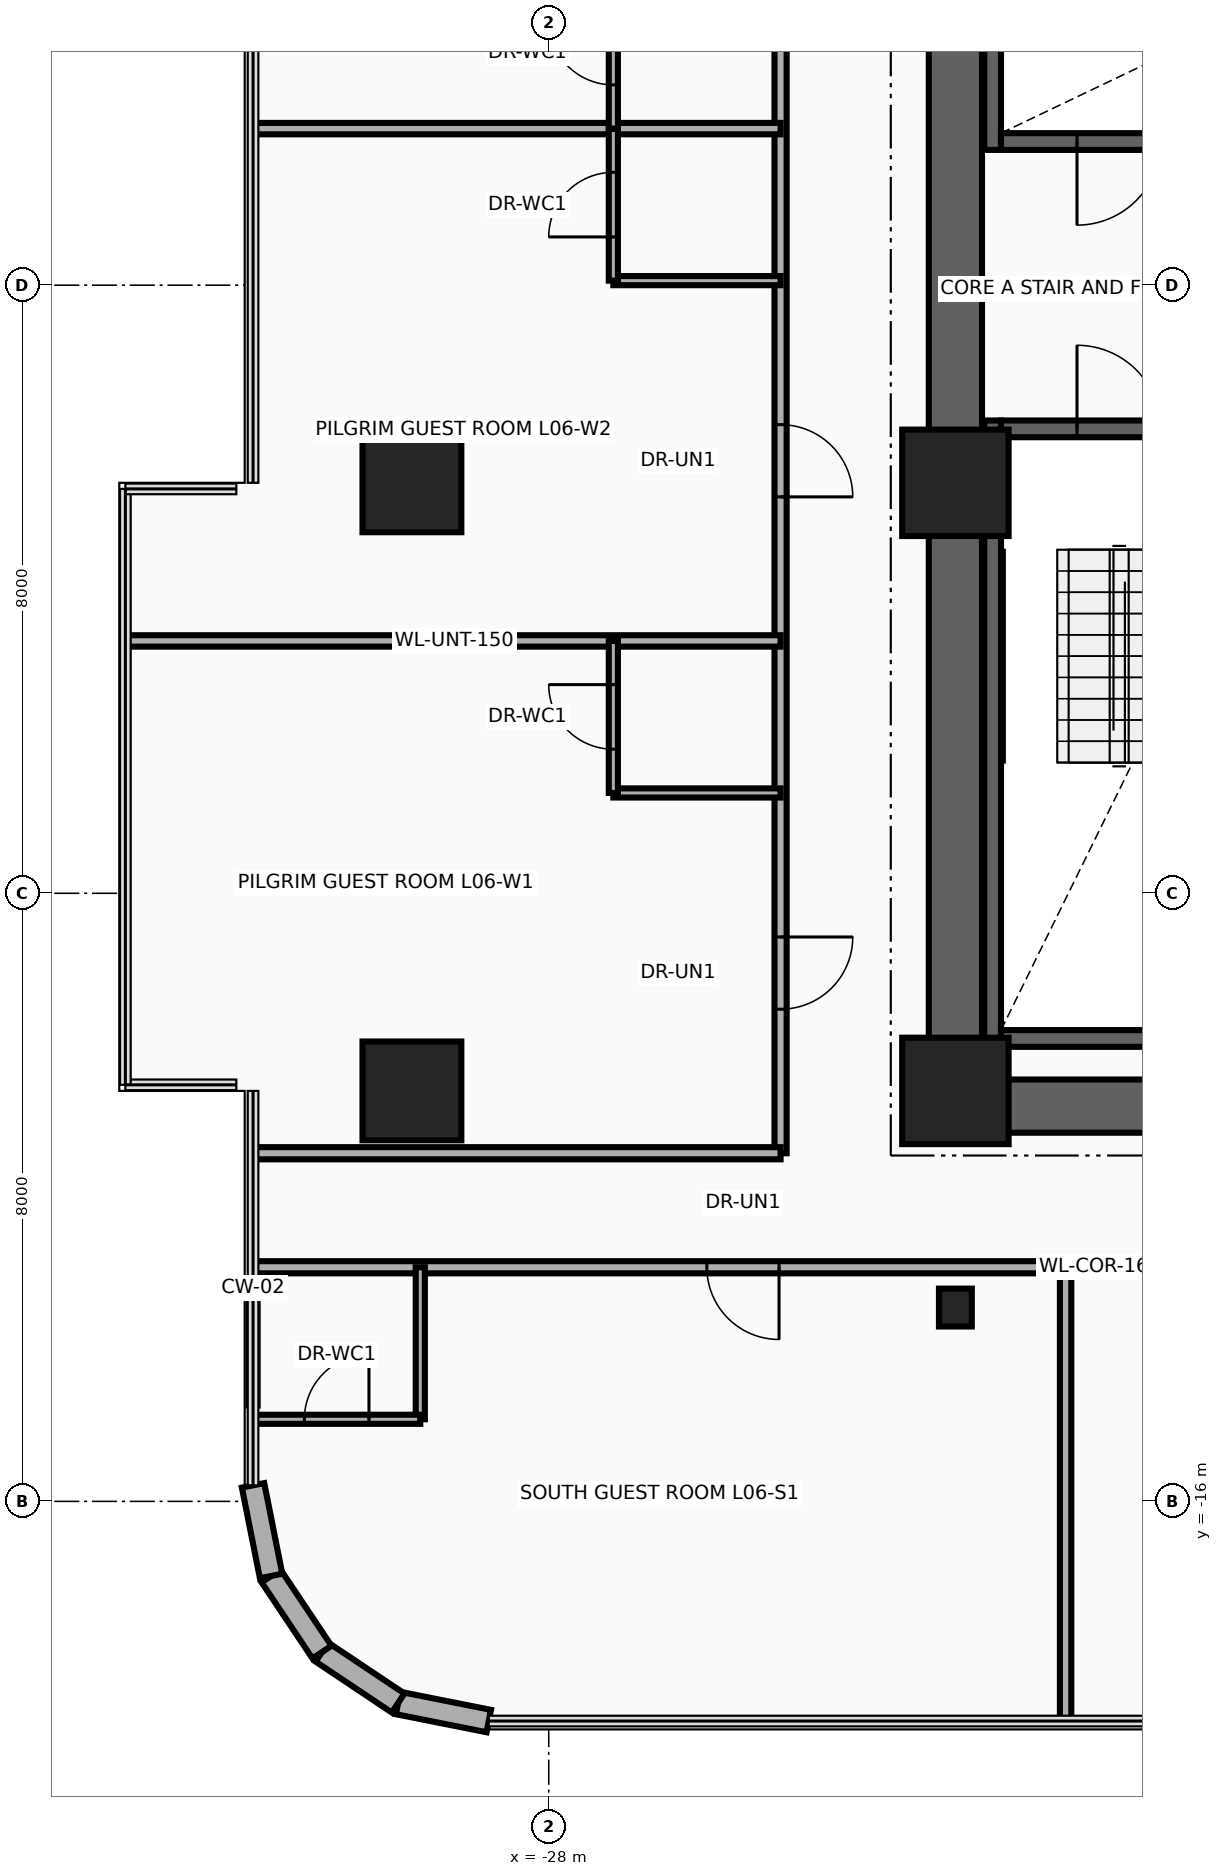
"""IFC4 building model, lengths in metres.
Left out: names, types, materials, properties, quantities, classifications, styles, units other than length and angle.
Written with IfcOpenShell. Run it as: python <this file> out.ifc"""

import sys

from ifc_helpers import new_model, si_unit, direction, frame, frame_2d, origin, origin_2d, place, context, subcontext, project, spatial, rectangle, circle, i_section, extrude, source, transform, mapped, element, fill, save


model = new_model("IFC4")
c1 = context("Model", 3, precision=1e-05, world=origin(), true_north=direction((0.0, 1.0)))
c2 = subcontext(c1, "Body", "Model", "MODEL_VIEW")
j1 = project(units=[si_unit("LENGTHUNIT", "METRE"), si_unit("PLANEANGLEUNIT", "RADIAN")], contexts=[c1])
p1 = place(None, origin())
s1 = spatial("IfcSite", under=j1, at=p1, CompositionType="ELEMENT")
p2 = place(p1, origin())
s2 = spatial("IfcBuilding", under=s1, at=p2, CompositionType="ELEMENT")
p3 = place(p2, frame((0.0, 0.0, 29.7)))
s3 = spatial("IfcBuildingStorey", under=s2, at=p3, CompositionType="ELEMENT", Elevation=29.7)
p4 = place(p3, frame((-22.16, 1.78, 0.0), z_axis=(0.0, 0.0, 1.0), x_axis=(0.0, 1.0, 0.0)))
e1 = element("IfcWall", 1, at=p4, inside=s3, PredefinedType="SHEAR", context=c2, shape_type="SweptSolid", body=[
    extrude(rectangle(XDim=8.67, YDim=0.22, at=frame_2d((4.335, 0.0))), origin(), (0.0, 0.0, 1.0), 3.46),
])
p5 = place(p3, frame((-22.05, 1.89, 0.0), z_axis=(0.0, 0.0, 1.0), x_axis=(1.0, 0.0, 0.0)))
e2 = element("IfcWall", 2, at=p5, inside=s3, PredefinedType="SHEAR", context=c2, shape_type="SweptSolid", body=[
    extrude(rectangle(XDim=3.11, YDim=0.22, at=frame_2d((1.555, 0.0))), origin(), (0.0, 0.0, 1.0), 3.46),
])
p6 = place(p5, frame((1.0, 0.0, 0.0)))
e3 = element("IfcOpeningElement", 3, at=p6, cuts=e2, PredefinedType="OPENING", context=c2, shape_type="SweptSolid", body=[
    extrude(rectangle(XDim=1.1, YDim=2.15, at=frame_2d((0.55, 1.075))), frame((0.0, 0.125, 0.0), z_axis=(0.0, -1.0, 0.0), x_axis=(1.0, 0.0, 0.0)), (0.0, 0.0, 1.0), 0.25),
])
p7 = place(p3, frame((-22.16, -10.45, 0.0), z_axis=(0.0, 0.0, 1.0), x_axis=(0.0, 1.0, 0.0)))
e4 = element("IfcWall", 4, at=p7, inside=s3, PredefinedType="SHEAR", context=c2, shape_type="SweptSolid", body=[
    extrude(rectangle(XDim=8.67, YDim=0.22, at=frame_2d((4.335, 0.0))), origin(), (0.0, 0.0, 1.0), 3.46),
])
p8 = place(p3, frame((-22.05, -9.91, 0.0), z_axis=(0.0, 0.0, 1.0), x_axis=(1.0, 0.0, 0.0)))
e5 = element("IfcWall", 5, at=p8, inside=s3, PredefinedType="SHEAR", context=c2, shape_type="SweptSolid", body=[
    extrude(rectangle(XDim=3.11, YDim=0.22, at=frame_2d((1.555, 0.0))), origin(), (0.0, 0.0, 1.0), 3.46),
])
p9 = place(p3, frame((-22.05, -1.89, 0.0), z_axis=(0.0, 0.0, 1.0), x_axis=(1.0, 0.0, 0.0)))
e6 = element("IfcWall", 6, at=p9, inside=s3, PredefinedType="SHEAR", context=c2, shape_type="SweptSolid", body=[
    extrude(rectangle(XDim=3.11, YDim=0.22, at=frame_2d((1.555, 0.0))), origin(), (0.0, 0.0, 1.0), 3.46),
])
p10 = place(p9, frame((1.0, 0.0, 0.0)))
e7 = element("IfcOpeningElement", 7, at=p10, cuts=e6, PredefinedType="OPENING", context=c2, shape_type="SweptSolid", body=[
    extrude(rectangle(XDim=1.1, YDim=2.15, at=frame_2d((0.55, 1.075))), frame((0.0, 0.125, 0.0), z_axis=(0.0, -1.0, 0.0), x_axis=(1.0, 0.0, 0.0)), (0.0, 0.0, 1.0), 0.25),
])
p11 = place(p3, frame((-22.65, -11.15, 0.0), z_axis=(0.0, 0.0, 1.0), x_axis=(0.0, 1.0, 0.0)))
e8 = element("IfcWall", 8, at=p11, inside=s3, PredefinedType="SHEAR", context=c2, shape_type="SweptSolid", body=[
    extrude(rectangle(XDim=22.3, YDim=0.7, at=frame_2d((11.15, 0.0))), origin(), (0.0, 0.0, 1.0), 3.46),
])
p12 = place(p3, frame((-22.65, -10.8, 0.0), z_axis=(0.0, 0.0, 1.0), x_axis=(1.0, 0.0, 0.0)))
e9 = element("IfcWall", 9, at=p12, inside=s3, PredefinedType="SHEAR", context=c2, shape_type="SweptSolid", body=[
    extrude(rectangle(XDim=10.25, YDim=0.7, at=frame_2d((5.125, 0.0))), origin(), (0.0, 0.0, 1.0), 3.46),
])
m1 = source(origin(), c2, "Body", "SweptSolid", [
    extrude(circle(Radius=0.65, at=origin_2d()), origin(), (0.0, 0.0, 1.0), 3.7),
])
p13 = place(p3, frame((-29.8, -10.6, 0.0), z_axis=(0.0, 0.0, 1.0), x_axis=(1.0, 0.0, 0.0)))
e10 = element("IfcColumn", 10, at=p13, inside=s3, PredefinedType="COLUMN", context=c2, shape_type="MappedRepresentation", body=[
    mapped(m1, transform((0.0, 0.0, 0.0), x_axis=(1.0, 0.0, 0.0), y_axis=(0.0, 1.0, 0.0), z_axis=(0.0, 0.0, 1.0), scale=1.0)),
])
m2 = source(origin(), c2, "Body", "SweptSolid", [
    extrude(rectangle(XDim=1.4, YDim=1.4, at=origin_2d()), origin(), (0.0, 0.0, 1.0), 3.7),
])
p14 = place(p3, frame((-22.65, -10.6, 0.0), z_axis=(0.0, 0.0, 1.0), x_axis=(1.0, 0.0, 0.0)))
e11 = element("IfcColumn", 11, at=p14, inside=s3, PredefinedType="COLUMN", context=c2, shape_type="MappedRepresentation", body=[
    mapped(m2, transform((0.0, 0.0, 0.0), x_axis=(1.0, 0.0, 0.0), y_axis=(0.0, 1.0, 0.0), z_axis=(0.0, 0.0, 1.0), scale=1.0)),
])
p15 = place(p3, frame((-29.8, -2.6, 0.0), z_axis=(0.0, 0.0, 1.0), x_axis=(1.0, 0.0, 0.0)))
e12 = element("IfcColumn", 12, at=p15, inside=s3, PredefinedType="COLUMN", context=c2, shape_type="MappedRepresentation", body=[
    mapped(m1, transform((0.0, 0.0, 0.0), x_axis=(1.0, 0.0, 0.0), y_axis=(0.0, 1.0, 0.0), z_axis=(0.0, 0.0, 1.0), scale=1.0)),
])
p16 = place(p3, frame((-22.65, -2.6, 0.0), z_axis=(0.0, 0.0, 1.0), x_axis=(1.0, 0.0, 0.0)))
e13 = element("IfcColumn", 13, at=p16, inside=s3, PredefinedType="COLUMN", context=c2, shape_type="MappedRepresentation", body=[
    mapped(m2, transform((0.0, 0.0, 0.0), x_axis=(1.0, 0.0, 0.0), y_axis=(0.0, 1.0, 0.0), z_axis=(0.0, 0.0, 1.0), scale=1.0)),
])
m3 = source(origin(), c2, "Body", "SweptSolid", [
    extrude(i_section(OverallWidth=0.432, OverallDepth=0.498, WebThickness=0.056, FlangeThickness=0.089, at=origin_2d()), origin(), (0.0, 0.0, 1.0), 3.7),
])
p17 = place(p3, frame((-22.65, -13.45, 0.0), z_axis=(0.0, 0.0, 1.0), x_axis=(1.0, 0.0, 0.0)))
e14 = element("IfcColumn", 14, at=p17, inside=s3, PredefinedType="COLUMN", context=c2, shape_type="MappedRepresentation", body=[
    mapped(m3, transform((0.0, 0.0, 0.0), x_axis=(1.0, 0.0, 0.0), y_axis=(0.0, 1.0, 0.0), z_axis=(0.0, 0.0, 1.0), scale=1.0)),
])
p18 = place(p3, frame((-28.789, -18.89, 0.0), z_axis=(0.0, 0.0, 1.0), x_axis=(-0.980804027463, 0.194996050505, 0.0)))
e15 = element("IfcWall", 15, at=p18, inside=s3, PredefinedType="SOLIDWALL", context=c2, shape_type="SweptSolid", body=[
    extrude(rectangle(XDim=1.216, YDim=0.3, at=frame_2d((0.608, 0.0))), origin(), (0.0, 0.0, 1.0), 3.46),
])
for number, where, z_axis, x_axis in (
    (16, (-29.982, -18.653, 0.0), (0.0, 0.0, 1.0), (-0.831, 0.556, 0.0)),
    (17, (-30.983, -17.983, 0.0), (0.0, 0.0, 1.0), (-0.556, 0.831, 0.0)),
):
    element("IfcWall", number, at=place(p3, frame(where, z_axis=z_axis, x_axis=x_axis)), inside=s3, PredefinedType="SOLIDWALL", context=c2, shape_type="SweptSolid", body=[
        extrude(rectangle(XDim=1.205, YDim=0.3, at=frame_2d((0.603, 0.0))), origin(), (0.0, 0.0, 1.0), 3.46),
    ])
p19 = place(p3, frame((-31.653, -16.982, 0.0), z_axis=(0.0, 0.0, 1.0), x_axis=(-0.194996050505, 0.980804027463, 0.0)))
e18 = element("IfcWall", 18, at=p19, inside=s3, PredefinedType="SOLIDWALL", context=c2, shape_type="SweptSolid", body=[
    extrude(rectangle(XDim=1.216, YDim=0.3, at=frame_2d((0.608, 0.0))), origin(), (0.0, 0.0, 1.0), 3.46),
])
p20 = place(p3, frame((-24.95, -11.42, 0.0), z_axis=(0.0, 0.0, 1.0), x_axis=(0.0, 1.0, 0.0)))
e19 = element("IfcWall", 19, at=p20, inside=s3, PredefinedType="PARTITIONING", context=c2, shape_type="SweptSolid", body=[
    extrude(rectangle(XDim=20.22, YDim=0.16, at=frame_2d((10.11, 0.0))), origin(), (0.0, 0.0, 1.0), 2.583),
])
p21 = place(p20, frame((1.895, 0.0, 0.0)))
e20 = element("IfcOpeningElement", 20, at=p21, cuts=e19, PredefinedType="OPENING", context=c2, shape_type="SweptSolid", body=[
    extrude(rectangle(XDim=0.95, YDim=2.15, at=frame_2d((0.475, 1.075))), frame((0.0, 0.095, 0.0), z_axis=(0.0, -1.0, 0.0), x_axis=(1.0, 0.0, 0.0)), (0.0, 0.0, 1.0), 0.19),
])
p22 = place(p20, frame((8.635, 0.0, 0.0)))
e21 = element("IfcOpeningElement", 21, at=p22, cuts=e19, PredefinedType="OPENING", context=c2, shape_type="SweptSolid", body=[
    extrude(rectangle(XDim=0.95, YDim=2.15, at=frame_2d((0.475, 1.075))), frame((0.0, 0.095, 0.0), z_axis=(0.0, -1.0, 0.0), x_axis=(1.0, 0.0, 0.0)), (0.0, 0.0, 1.0), 0.19),
])
p23 = place(p20, frame((17.375, 0.0, 0.0)))
e22 = element("IfcOpeningElement", 22, at=p23, cuts=e19, PredefinedType="OPENING", context=c2, shape_type="SweptSolid", body=[
    extrude(rectangle(XDim=0.95, YDim=2.15, at=frame_2d((0.475, 1.075))), frame((0.0, 0.095, 0.0), z_axis=(0.0, -1.0, 0.0), x_axis=(1.0, 0.0, 0.0)), (0.0, 0.0, 1.0), 0.19),
])
p24 = place(p3, frame((-33.54, -4.68, 0.0), z_axis=(0.0, 0.0, 1.0), x_axis=(1.0, 0.0, 0.0)))
e23 = element("IfcWall", 23, at=p24, inside=s3, PredefinedType="PARTITIONING", context=c2, shape_type="SweptSolid", body=[
    extrude(rectangle(XDim=8.59, YDim=0.15, at=frame_2d((4.295, 0.0))), origin(), (0.0, 0.0, 1.0), 2.896),
])
p25 = place(p3, frame((-31.89, 2.06, 0.0), z_axis=(0.0, 0.0, 1.0), x_axis=(1.0, 0.0, 0.0)))
e24 = element("IfcWall", 24, at=p25, inside=s3, PredefinedType="PARTITIONING", context=c2, shape_type="SweptSolid", body=[
    extrude(rectangle(XDim=6.94, YDim=0.15, at=frame_2d((3.47, 0.0))), origin(), (0.0, 0.0, 1.0), 2.896),
])
p26 = place(p3, frame((-27.15, -6.68, 0.0), z_axis=(0.0, 0.0, 1.0), x_axis=(1.0, 0.0, 0.0)))
e25 = element("IfcWall", 25, at=p26, inside=s3, PredefinedType="PARTITIONING", context=c2, shape_type="SweptSolid", body=[
    extrude(rectangle(XDim=2.2, YDim=0.12, at=frame_2d((1.1, 0.0))), origin(), (0.0, 0.0, 1.0), 2.979),
])
p27 = place(p3, frame((-27.15, -6.68, 0.0), z_axis=(0.0, 0.0, 1.0), x_axis=(0.0, 1.0, 0.0)))
e26 = element("IfcWall", 26, at=p27, inside=s3, PredefinedType="PARTITIONING", context=c2, shape_type="SweptSolid", body=[
    extrude(rectangle(XDim=2.0, YDim=0.12, at=frame_2d((1.0, 0.0))), origin(), (0.0, 0.0, 1.0), 2.979),
])
p28 = place(p27, frame((0.575, 0.0, 0.0)))
e27 = element("IfcOpeningElement", 27, at=p28, cuts=e26, PredefinedType="OPENING", context=c2, shape_type="SweptSolid", body=[
    extrude(rectangle(XDim=0.85, YDim=2.1, at=frame_2d((0.425, 1.05))), frame((0.0, 0.075, 0.0), z_axis=(0.0, -1.0, 0.0), x_axis=(1.0, 0.0, 0.0)), (0.0, 0.0, 1.0), 0.15),
])
p29 = place(p3, frame((-27.15, 0.06, 0.0), z_axis=(0.0, 0.0, 1.0), x_axis=(1.0, 0.0, 0.0)))
e28 = element("IfcWall", 28, at=p29, inside=s3, PredefinedType="PARTITIONING", context=c2, shape_type="SweptSolid", body=[
    extrude(rectangle(XDim=2.2, YDim=0.12, at=frame_2d((1.1, 0.0))), origin(), (0.0, 0.0, 1.0), 2.979),
])
p30 = place(p3, frame((-27.15, 0.06, 0.0), z_axis=(0.0, 0.0, 1.0), x_axis=(0.0, 1.0, 0.0)))
e29 = element("IfcWall", 29, at=p30, inside=s3, PredefinedType="PARTITIONING", context=c2, shape_type="SweptSolid", body=[
    extrude(rectangle(XDim=2.0, YDim=0.12, at=frame_2d((1.0, 0.0))), origin(), (0.0, 0.0, 1.0), 2.979),
])
p31 = place(p30, frame((0.575, 0.0, 0.0)))
e30 = element("IfcOpeningElement", 30, at=p31, cuts=e29, PredefinedType="OPENING", context=c2, shape_type="SweptSolid", body=[
    extrude(rectangle(XDim=0.85, YDim=2.1, at=frame_2d((0.425, 1.05))), frame((0.0, 0.075, 0.0), z_axis=(0.0, -1.0, 0.0), x_axis=(1.0, 0.0, 0.0)), (0.0, 0.0, 1.0), 0.15),
])
p32 = place(p3, frame((-27.15, 2.06, 0.0), z_axis=(0.0, 0.0, 1.0), x_axis=(0.0, 1.0, 0.0)))
e31 = element("IfcWall", 31, at=p32, inside=s3, PredefinedType="PARTITIONING", context=c2, shape_type="SweptSolid", body=[
    extrude(rectangle(XDim=2.0, YDim=0.12, at=frame_2d((1.0, 0.0))), origin(), (0.0, 0.0, 1.0), 2.979),
])
p33 = place(p32, frame((0.575, 0.0, 0.0)))
e32 = element("IfcOpeningElement", 32, at=p33, cuts=e31, PredefinedType="OPENING", context=c2, shape_type="SweptSolid", body=[
    extrude(rectangle(XDim=0.85, YDim=2.1, at=frame_2d((0.425, 1.05))), frame((0.0, 0.075, 0.0), z_axis=(0.0, -1.0, 0.0), x_axis=(1.0, 0.0, 0.0)), (0.0, 0.0, 1.0), 0.15),
])
p34 = place(p3, frame((-31.89, -12.92, 0.0), z_axis=(0.0, 0.0, 1.0), x_axis=(1.0, 0.0, 0.0)))
e33 = element("IfcWall", 33, at=p34, inside=s3, PredefinedType="PARTITIONING", context=c2, shape_type="SweptSolid", body=[
    extrude(rectangle(XDim=22.28, YDim=0.16, at=frame_2d((11.14, 0.0))), origin(), (0.0, 0.0, 1.0), 2.834),
])
p35 = place(p34, frame((5.97, 0.0, 0.0)))
e34 = element("IfcOpeningElement", 34, at=p35, cuts=e33, PredefinedType="OPENING", context=c2, shape_type="SweptSolid", body=[
    extrude(rectangle(XDim=0.95, YDim=2.15, at=frame_2d((0.475, 1.075))), frame((0.0, 0.095, 0.0), z_axis=(0.0, -1.0, 0.0), x_axis=(1.0, 0.0, 0.0)), (0.0, 0.0, 1.0), 0.19),
])
p36 = place(p34, frame((16.01, 0.0, 0.0)))
e35 = element("IfcOpeningElement", 35, at=p36, cuts=e33, PredefinedType="OPENING", context=c2, shape_type="SweptSolid", body=[
    extrude(rectangle(XDim=0.95, YDim=2.15, at=frame_2d((0.475, 1.075))), frame((0.0, 0.095, 0.0), z_axis=(0.0, -1.0, 0.0), x_axis=(1.0, 0.0, 0.0)), (0.0, 0.0, 1.0), 0.19),
])
p37 = place(p3, frame((-21.2, -18.89, 0.0), z_axis=(0.0, 0.0, 1.0), x_axis=(0.0, 1.0, 0.0)))
e36 = element("IfcWall", 36, at=p37, inside=s3, PredefinedType="PARTITIONING", context=c2, shape_type="SweptSolid", body=[
    extrude(rectangle(XDim=5.97, YDim=0.15, at=frame_2d((2.985, 0.0))), origin(), (0.0, 0.0, 1.0), 2.896),
])
p38 = place(p3, frame((-29.69, -14.92, 0.0), z_axis=(0.0, 0.0, 1.0), x_axis=(0.0, 1.0, 0.0)))
e37 = element("IfcWall", 37, at=p38, inside=s3, PredefinedType="PARTITIONING", context=c2, shape_type="SweptSolid", body=[
    extrude(rectangle(XDim=2.0, YDim=0.12, at=frame_2d((1.0, 0.0))), origin(), (0.0, 0.0, 1.0), 3.46),
])
p39 = place(p3, frame((-31.89, -14.92, 0.0), z_axis=(0.0, 0.0, 1.0), x_axis=(1.0, 0.0, 0.0)))
e38 = element("IfcWall", 38, at=p39, inside=s3, PredefinedType="PARTITIONING", context=c2, shape_type="SweptSolid", body=[
    extrude(rectangle(XDim=2.2, YDim=0.12, at=frame_2d((1.1, 0.0))), origin(), (0.0, 0.0, 1.0), 3.46),
])
p40 = place(p39, frame((0.675, 0.0, 0.0)))
e39 = element("IfcOpeningElement", 39, at=p40, cuts=e38, PredefinedType="OPENING", context=c2, shape_type="SweptSolid", body=[
    extrude(rectangle(XDim=0.85, YDim=2.1, at=frame_2d((0.425, 1.05))), frame((0.0, 0.075, 0.0), z_axis=(0.0, -1.0, 0.0), x_axis=(1.0, 0.0, 0.0)), (0.0, 0.0, 1.0), 0.15),
])
p41 = place(p3, frame((-31.89, -14.74, 0.0), z_axis=(0.0, 0.0, 1.0), x_axis=(0.0, 1.0, 0.0)))
e40 = element("IfcWall", 40, at=p41, inside=s3, PredefinedType="PARTITIONING", context=c2, shape_type="SweptSolid", body=[
    extrude(rectangle(XDim=1.62, YDim=0.12, at=frame_2d((0.81, 0.0))), origin(), (0.0, 0.0, 1.0), 3.46),
])
p42 = place(p3, frame((-31.89, -11.42, 0.0), z_axis=(0.0, 0.0, 1.0), x_axis=(1.0, 0.0, 0.0)))
e41 = element("IfcWall", 41, at=p42, inside=s3, PredefinedType="PARTITIONING", context=c2, shape_type="SweptSolid", body=[
    extrude(rectangle(XDim=6.94, YDim=0.16, at=frame_2d((3.47, 0.0))), origin(), (0.0, 0.0, 1.0), 3.46),
])
p43 = place(p6, frame((1.1, 0.0, 0.0), z_axis=(0.0, 0.0, 1.0), x_axis=(-1.0, 0.0, 0.0)))
e42 = element("IfcDoor", 42, at=p43, inside=s3, OperationType="SINGLE_SWING_LEFT", PredefinedType="DOOR", context=c2, shape_type="SweptSolid", body=[
    extrude(rectangle(XDim=1.1, YDim=2.15, at=frame_2d((0.55, 1.075))), frame((0.0, 0.025, 0.0), z_axis=(0.0, -1.0, 0.0), x_axis=(1.0, 0.0, 0.0)), (0.0, 0.0, 1.0), 0.05),
])
fill(e3, e42)
p44 = place(p10, origin())
e43 = element("IfcDoor", 43, at=p44, inside=s3, OperationType="SINGLE_SWING_RIGHT", PredefinedType="DOOR", context=c2, shape_type="SweptSolid", body=[
    extrude(rectangle(XDim=1.1, YDim=2.15, at=frame_2d((0.55, 1.075))), frame((0.0, 0.025, 0.0), z_axis=(0.0, -1.0, 0.0), x_axis=(1.0, 0.0, 0.0)), (0.0, 0.0, 1.0), 0.05),
])
fill(e7, e43)
p45 = place(p21, frame((0.95, 0.0, 0.0), z_axis=(0.0, 0.0, 1.0), x_axis=(-1.0, 0.0, 0.0)))
e44 = element("IfcDoor", 44, at=p45, inside=s3, OperationType="SINGLE_SWING_LEFT", PredefinedType="DOOR", context=c2, shape_type="SweptSolid", body=[
    extrude(rectangle(XDim=0.95, YDim=2.15, at=frame_2d((0.475, 1.075))), frame((0.0, 0.025, 0.0), z_axis=(0.0, -1.0, 0.0), x_axis=(1.0, 0.0, 0.0)), (0.0, 0.0, 1.0), 0.05),
])
fill(e20, e44)
p46 = place(p28, origin())
e45 = element("IfcDoor", 45, at=p46, inside=s3, OperationType="SINGLE_SWING_RIGHT", PredefinedType="DOOR", context=c2, shape_type="SweptSolid", body=[
    extrude(rectangle(XDim=0.85, YDim=2.1, at=frame_2d((0.425, 1.05))), frame((0.0, 0.025, 0.0), z_axis=(0.0, -1.0, 0.0), x_axis=(1.0, 0.0, 0.0)), (0.0, 0.0, 1.0), 0.05),
])
fill(e27, e45)
p47 = place(p22, frame((0.95, 0.0, 0.0), z_axis=(0.0, 0.0, 1.0), x_axis=(-1.0, 0.0, 0.0)))
e46 = element("IfcDoor", 46, at=p47, inside=s3, OperationType="SINGLE_SWING_LEFT", PredefinedType="DOOR", context=c2, shape_type="SweptSolid", body=[
    extrude(rectangle(XDim=0.95, YDim=2.15, at=frame_2d((0.475, 1.075))), frame((0.0, 0.025, 0.0), z_axis=(0.0, -1.0, 0.0), x_axis=(1.0, 0.0, 0.0)), (0.0, 0.0, 1.0), 0.05),
])
fill(e21, e46)
p48 = place(p31, origin())
e47 = element("IfcDoor", 47, at=p48, inside=s3, OperationType="SINGLE_SWING_RIGHT", PredefinedType="DOOR", context=c2, shape_type="SweptSolid", body=[
    extrude(rectangle(XDim=0.85, YDim=2.1, at=frame_2d((0.425, 1.05))), frame((0.0, 0.025, 0.0), z_axis=(0.0, -1.0, 0.0), x_axis=(1.0, 0.0, 0.0)), (0.0, 0.0, 1.0), 0.05),
])
fill(e30, e47)
p49 = place(p33, origin())
e48 = element("IfcDoor", 48, at=p49, inside=s3, OperationType="SINGLE_SWING_RIGHT", PredefinedType="DOOR", context=c2, shape_type="SweptSolid", body=[
    extrude(rectangle(XDim=0.85, YDim=2.1, at=frame_2d((0.425, 1.05))), frame((0.0, 0.025, 0.0), z_axis=(0.0, -1.0, 0.0), x_axis=(1.0, 0.0, 0.0)), (0.0, 0.0, 1.0), 0.05),
])
fill(e32, e48)
p50 = place(p35, frame((0.95, 0.0, 0.0), z_axis=(0.0, 0.0, 1.0), x_axis=(-1.0, 0.0, 0.0)))
e49 = element("IfcDoor", 49, at=p50, inside=s3, OperationType="SINGLE_SWING_LEFT", PredefinedType="DOOR", context=c2, shape_type="SweptSolid", body=[
    extrude(rectangle(XDim=0.95, YDim=2.15, at=frame_2d((0.475, 1.075))), frame((0.0, 0.025, 0.0), z_axis=(0.0, -1.0, 0.0), x_axis=(1.0, 0.0, 0.0)), (0.0, 0.0, 1.0), 0.05),
])
fill(e34, e49)
p51 = place(p40, origin())
e50 = element("IfcDoor", 50, at=p51, inside=s3, OperationType="SINGLE_SWING_RIGHT", PredefinedType="DOOR", context=c2, shape_type="SweptSolid", body=[
    extrude(rectangle(XDim=0.85, YDim=2.1, at=frame_2d((0.425, 1.05))), frame((0.0, 0.025, 0.0), z_axis=(0.0, -1.0, 0.0), x_axis=(1.0, 0.0, 0.0)), (0.0, 0.0, 1.0), 0.05),
])
fill(e39, e50)
save(model, sys.argv[1])
